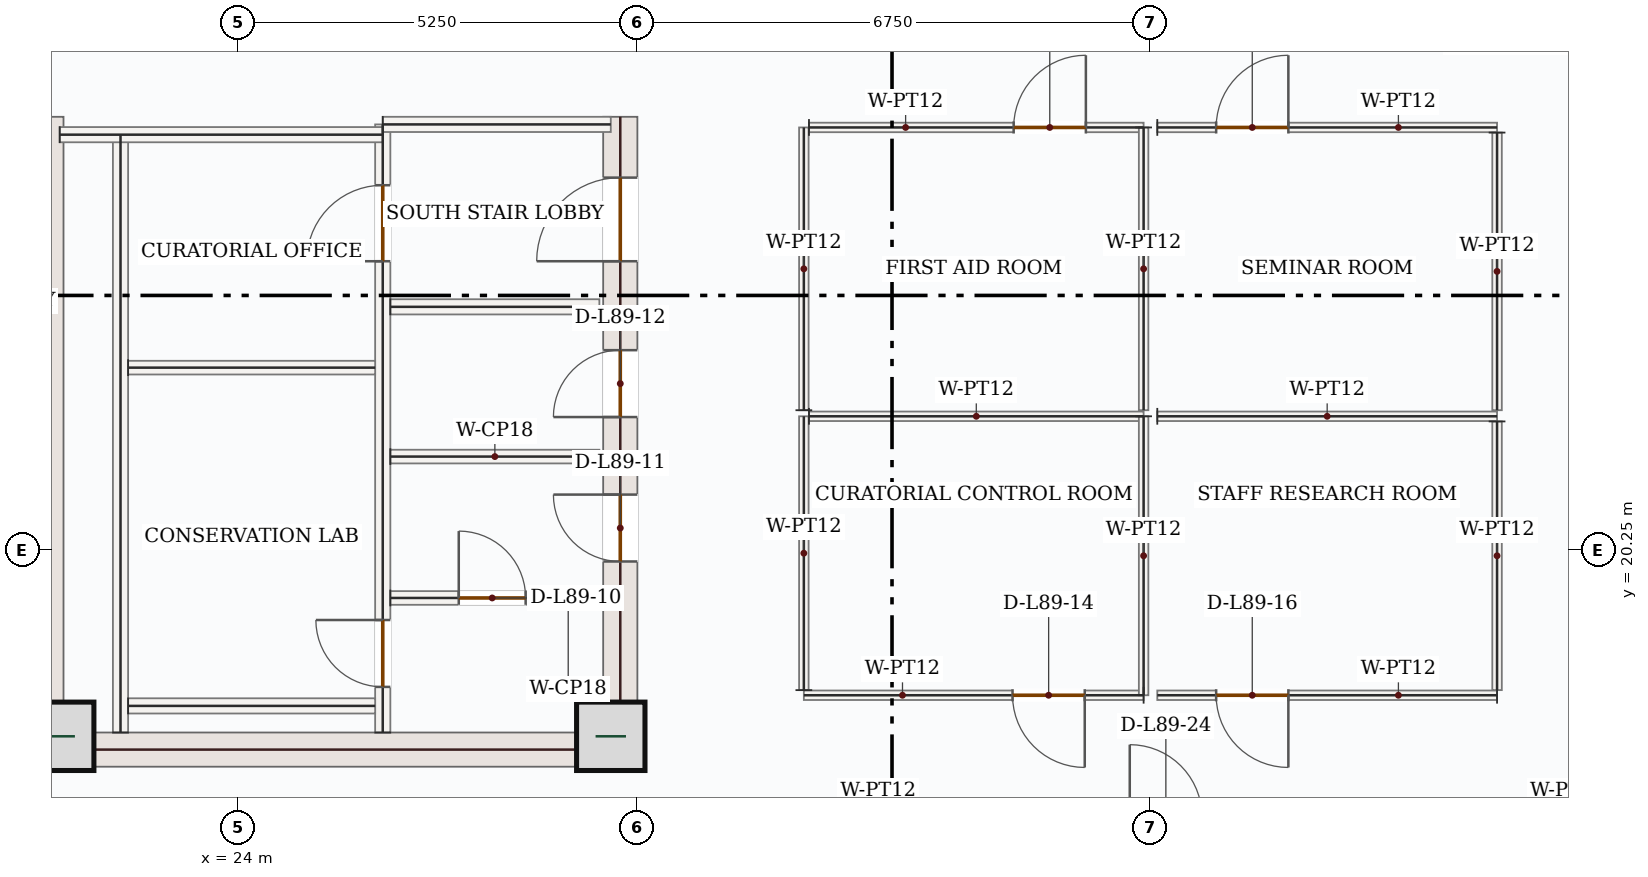
"""IFC4 building model, lengths in metres.
Left out: names, types, materials, properties, quantities, classifications, styles, units other than length and angle.
Written with IfcOpenShell. Run it as: python <this file> out.ifc"""

import sys

from ifc_helpers import new_model, si_unit, direction, frame, frame_2d, origin, origin_2d, place, context, subcontext, project, spatial, rectangle, extrude, source, transform, mapped, element, fill, save


model = new_model("IFC4")
c1 = context("Model", 3, precision=1e-05, world=origin(), true_north=direction((0.0, 1.0)))
c2 = subcontext(c1, "Body", "Model", "MODEL_VIEW")
j1 = project(units=[si_unit("LENGTHUNIT", "METRE"), si_unit("PLANEANGLEUNIT", "RADIAN")], contexts=[c1])
p1 = place(None, origin())
s1 = spatial("IfcSite", under=j1, at=p1, CompositionType="ELEMENT")
p2 = place(p1, origin())
s2 = spatial("IfcBuilding", under=s1, at=p2, CompositionType="ELEMENT")
p3 = place(p2, frame((0.0, 0.0, 365.85)))
s3 = spatial("IfcBuildingStorey", under=s2, at=p3, CompositionType="ELEMENT", Elevation=365.85)
m1 = source(origin(), c2, "Body", "SweptSolid", [
    extrude(rectangle(XDim=8.55, YDim=0.45, at=frame_2d((4.275, 0.0))), origin(), (0.0, 0.0, 1.0), 4.55),
])
p4 = place(p3, frame((21.475, 17.4, 0.0), z_axis=(0.0, 0.0, 1.0), x_axis=(0.0, 1.0, 0.0)))
e1 = element("IfcWall", 1, at=p4, inside=s3, PredefinedType="SHEAR", context=c2, shape_type="MappedRepresentation", body=[
    mapped(m1, transform((0.0, 0.0, 0.0), x_axis=(1.0, 0.0, 0.0), y_axis=(0.0, 1.0, 0.0), z_axis=(0.0, 0.0, 1.0), scale=1.0)),
])
p5 = place(p3, frame((29.025, 17.4, 0.0), z_axis=(0.0, 0.0, 1.0), x_axis=(0.0, 1.0, 0.0)))
e2 = element("IfcWall", 2, at=p5, inside=s3, PredefinedType="SHEAR", context=c2, shape_type="SweptSolid", body=[
    extrude(rectangle(XDim=8.55, YDim=0.45, at=frame_2d((4.275, 0.0))), origin(), (0.0, 0.0, 1.0), 4.55),
])
p6 = place(p5, frame((6.65, 0.0, 0.0)))
e3 = element("IfcOpeningElement", 3, at=p6, cuts=e2, PredefinedType="OPENING", context=c2, shape_type="SweptSolid", body=[
    extrude(rectangle(XDim=1.1, YDim=2.2, at=frame_2d((0.55, 1.1))), frame((0.0, 0.235, 0.0), z_axis=(0.0, -1.0, 0.0), x_axis=(1.0, 0.0, 0.0)), (0.0, 0.0, 1.0), 0.47),
])
p7 = place(p5, frame((2.7, 0.0, 0.0)))
e4 = element("IfcOpeningElement", 4, at=p7, cuts=e2, PredefinedType="OPENING", context=c2, shape_type="SweptSolid", body=[
    extrude(rectangle(XDim=0.88, YDim=2.1, at=frame_2d((0.44, 1.05))), frame((0.0, 0.235, 0.0), z_axis=(0.0, -1.0, 0.0), x_axis=(1.0, 0.0, 0.0)), (0.0, 0.0, 1.0), 0.47),
])
p8 = place(p5, frame((4.6, 0.0, 0.0)))
e5 = element("IfcOpeningElement", 5, at=p8, cuts=e2, PredefinedType="OPENING", context=c2, shape_type="SweptSolid", body=[
    extrude(rectangle(XDim=0.88, YDim=2.1, at=frame_2d((0.44, 1.05))), frame((0.0, 0.235, 0.0), z_axis=(0.0, -1.0, 0.0), x_axis=(1.0, 0.0, 0.0)), (0.0, 0.0, 1.0), 0.47),
])
m2 = source(origin(), c2, "Body", "SweptSolid", [
    extrude(rectangle(XDim=7.1, YDim=0.45, at=frame_2d((3.55, 0.0))), origin(), (0.0, 0.0, 1.0), 4.55),
])
p9 = place(p3, frame((21.7, 17.625, 0.0), z_axis=(0.0, 0.0, 1.0), x_axis=(1.0, 0.0, 0.0)))
e6 = element("IfcWall", 6, at=p9, inside=s3, PredefinedType="SHEAR", context=c2, shape_type="MappedRepresentation", body=[
    mapped(m2, transform((0.0, 0.0, 0.0), x_axis=(1.0, 0.0, 0.0), y_axis=(0.0, 1.0, 0.0), z_axis=(0.0, 0.0, 1.0), scale=1.0)),
])
m3 = source(origin(), c2, "Body", "SweptSolid", [
    extrude(rectangle(XDim=0.9, YDim=0.9, at=origin_2d()), origin(), (0.0, 0.0, 1.0), 4.8),
])
for number, where, z_axis, x_axis in (
    (7, (21.65, 17.8, 0.0), (0.0, 0.0, 1.0), (1.0, 0.0, 0.0)),
    (8, (28.9, 17.8, 0.0), (0.0, 0.0, 1.0), (1.0, 0.0, 0.0)),
):
    element("IfcColumn", number, at=place(p3, frame(where, z_axis=z_axis, x_axis=x_axis)), inside=s3, PredefinedType="COLUMN", context=c2, shape_type="MappedRepresentation", body=[
        mapped(m3, transform((0.0, 0.0, 0.0), x_axis=(1.0, 0.0, 0.0), y_axis=(0.0, 1.0, 0.0), z_axis=(0.0, 0.0, 1.0), scale=1.0)),
    ])
p10 = place(p3, frame((22.658, 14.74, 0.0), z_axis=(0.0, 0.0, 1.0), x_axis=(-0.707106781187, 0.707106781187, 0.0)))
e9 = element("IfcWall", 9, at=p10, inside=s3, PredefinedType="SOLIDWALL", context=c2, shape_type="SweptSolid", body=[
    extrude(rectangle(XDim=5.258, YDim=0.28, at=frame_2d((2.629, 0.0))), origin(), (0.0, 0.0, 1.0), 4.55),
])
p11 = place(p10, frame((1.879, 0.0, 0.85)))
e10 = element("IfcOpeningElement", 10, at=p11, cuts=e9, PredefinedType="OPENING", context=c2, shape_type="SweptSolid", body=[
    extrude(rectangle(XDim=1.5, YDim=1.5, at=frame_2d((0.75, 0.75))), frame((0.0, 0.15, 0.0), z_axis=(0.0, -1.0, 0.0), x_axis=(1.0, 0.0, 0.0)), (0.0, 0.0, 1.0), 0.3),
])
m4 = source(origin(), c2, "Body", "SweptSolid", [
    extrude(rectangle(XDim=7.87, YDim=0.2, at=frame_2d((3.935, 0.0))), origin(), (0.0, 0.0, 1.0), 4.55),
])
p12 = place(p3, frame((22.45, 17.85, 0.0), z_axis=(0.0, 0.0, 1.0), x_axis=(0.0, 1.0, 0.0)))
e11 = element("IfcWall", 11, at=p12, inside=s3, PredefinedType="SOLIDWALL", context=c2, shape_type="MappedRepresentation", body=[
    mapped(m4, transform((0.0, 0.0, 0.0), x_axis=(1.0, 0.0, 0.0), y_axis=(0.0, 1.0, 0.0), z_axis=(0.0, 0.0, 1.0), scale=1.0)),
])
p13 = place(p3, frame((25.9, 17.85, 0.0), z_axis=(0.0, 0.0, 1.0), x_axis=(0.0, 1.0, 0.0)))
e12 = element("IfcWall", 12, at=p13, inside=s3, PredefinedType="SOLIDWALL", context=c2, shape_type="SweptSolid", body=[
    extrude(rectangle(XDim=8.0, YDim=0.2, at=frame_2d((4.0, 0.0))), origin(), (0.0, 0.0, 1.0), 4.55),
])
p14 = place(p13, frame((6.2, 0.0, 0.0)))
e13 = element("IfcOpeningElement", 13, at=p14, cuts=e12, PredefinedType="OPENING", context=c2, shape_type="SweptSolid", body=[
    extrude(rectangle(XDim=1.0, YDim=2.15, at=frame_2d((0.5, 1.075))), frame((0.0, 0.11, 0.0), z_axis=(0.0, -1.0, 0.0), x_axis=(1.0, 0.0, 0.0)), (0.0, 0.0, 1.0), 0.22),
])
p15 = place(p13, frame((0.6, 0.0, 0.0)))
e14 = element("IfcOpeningElement", 14, at=p15, cuts=e12, PredefinedType="OPENING", context=c2, shape_type="SweptSolid", body=[
    extrude(rectangle(XDim=0.88, YDim=2.1, at=frame_2d((0.44, 1.05))), frame((0.0, 0.11, 0.0), z_axis=(0.0, -1.0, 0.0), x_axis=(1.0, 0.0, 0.0)), (0.0, 0.0, 1.0), 0.22),
])
m5 = source(origin(), c2, "Body", "SweptSolid", [
    extrude(rectangle(XDim=4.25, YDim=0.2, at=frame_2d((2.125, 0.0))), origin(), (0.0, 0.0, 1.0), 4.55),
])
p16 = place(p3, frame((21.65, 25.715, 0.0), z_axis=(0.0, 0.0, 1.0), x_axis=(1.0, 0.0, 0.0)))
e15 = element("IfcWall", 15, at=p16, inside=s3, PredefinedType="SOLIDWALL", context=c2, shape_type="MappedRepresentation", body=[
    mapped(m5, transform((0.0, 0.0, 0.0), x_axis=(1.0, 0.0, 0.0), y_axis=(0.0, 1.0, 0.0), z_axis=(0.0, 0.0, 1.0), scale=1.0)),
])
m6 = source(origin(), c2, "Body", "SweptSolid", [
    extrude(rectangle(XDim=3.0, YDim=0.2, at=frame_2d((1.5, 0.0))), origin(), (0.0, 0.0, 1.0), 4.55),
])
p17 = place(p3, frame((25.9, 25.85, 0.0), z_axis=(0.0, 0.0, 1.0), x_axis=(1.0, 0.0, 0.0)))
e16 = element("IfcWall", 16, at=p17, inside=s3, PredefinedType="SOLIDWALL", context=c2, shape_type="MappedRepresentation", body=[
    mapped(m6, transform((0.0, 0.0, 0.0), x_axis=(1.0, 0.0, 0.0), y_axis=(0.0, 1.0, 0.0), z_axis=(0.0, 0.0, 1.0), scale=1.0)),
])
m7 = source(origin(), c2, "Body", "SweptSolid", [
    extrude(rectangle(XDim=3.25, YDim=0.2, at=frame_2d((1.625, 0.0))), origin(), (0.0, 0.0, 1.0), 4.55),
])
p18 = place(p3, frame((22.55, 18.2, 0.0), z_axis=(0.0, 0.0, 1.0), x_axis=(1.0, 0.0, 0.0)))
e17 = element("IfcWall", 17, at=p18, inside=s3, PredefinedType="SOLIDWALL", context=c2, shape_type="MappedRepresentation", body=[
    mapped(m7, transform((0.0, 0.0, 0.0), x_axis=(1.0, 0.0, 0.0), y_axis=(0.0, 1.0, 0.0), z_axis=(0.0, 0.0, 1.0), scale=1.0)),
])
m8 = source(origin(), c2, "Body", "SweptSolid", [
    extrude(rectangle(XDim=3.25, YDim=0.18, at=frame_2d((1.625, 0.0))), origin(), (0.0, 0.0, 1.0), 4.55),
])
p19 = place(p3, frame((22.55, 22.65, 0.0), z_axis=(0.0, 0.0, 1.0), x_axis=(1.0, 0.0, 0.0)))
e18 = element("IfcWall", 18, at=p19, inside=s3, PredefinedType="PARTITIONING", context=c2, shape_type="MappedRepresentation", body=[
    mapped(m8, transform((0.0, 0.0, 0.0), x_axis=(1.0, 0.0, 0.0), y_axis=(0.0, 1.0, 0.0), z_axis=(0.0, 0.0, 1.0), scale=1.0)),
])
m9 = source(origin(), c2, "Body", "SweptSolid", [
    extrude(rectangle(XDim=2.75, YDim=0.2, at=frame_2d((1.375, 0.0))), origin(), (0.0, 0.0, 1.0), 4.55),
])
p20 = place(p3, frame((26.0, 23.45, 0.0), z_axis=(0.0, 0.0, 1.0), x_axis=(1.0, 0.0, 0.0)))
e19 = element("IfcWall", 19, at=p20, inside=s3, PredefinedType="SOLIDWALL", context=c2, shape_type="MappedRepresentation", body=[
    mapped(m9, transform((0.0, 0.0, 0.0), x_axis=(1.0, 0.0, 0.0), y_axis=(0.0, 1.0, 0.0), z_axis=(0.0, 0.0, 1.0), scale=1.0)),
])
p21 = place(p3, frame((26.0, 19.62, 0.0), z_axis=(0.0, 0.0, 1.0), x_axis=(1.0, 0.0, 0.0)))
e20 = element("IfcWall", 20, at=p21, inside=s3, PredefinedType="PARTITIONING", context=c2, shape_type="SweptSolid", body=[
    extrude(rectangle(XDim=2.75, YDim=0.18, at=frame_2d((1.375, 0.0))), origin(), (0.0, 0.0, 1.0), 4.55),
])
p22 = place(p21, frame((0.9, 0.0, 0.0)))
e21 = element("IfcOpeningElement", 21, at=p22, cuts=e20, PredefinedType="OPENING", context=c2, shape_type="SweptSolid", body=[
    extrude(rectangle(XDim=0.88, YDim=2.1, at=frame_2d((0.44, 1.05))), frame((0.0, 0.1, 0.0), z_axis=(0.0, -1.0, 0.0), x_axis=(1.0, 0.0, 0.0)), (0.0, 0.0, 1.0), 0.2),
])
m10 = source(origin(), c2, "Body", "SweptSolid", [
    extrude(rectangle(XDim=2.75, YDim=0.18, at=frame_2d((1.375, 0.0))), origin(), (0.0, 0.0, 1.0), 4.55),
])
p23 = place(p3, frame((26.0, 21.48, 0.0), z_axis=(0.0, 0.0, 1.0), x_axis=(1.0, 0.0, 0.0)))
e22 = element("IfcWall", 22, at=p23, inside=s3, PredefinedType="PARTITIONING", context=c2, shape_type="MappedRepresentation", body=[
    mapped(m10, transform((0.0, 0.0, 0.0), x_axis=(1.0, 0.0, 0.0), y_axis=(0.0, 1.0, 0.0), z_axis=(0.0, 0.0, 1.0), scale=1.0)),
])
p24 = place(p3, frame((35.91, 18.34, 0.0), z_axis=(0.0, 0.0, 1.0), x_axis=(-1.0, 0.0, 0.0)))
e23 = element("IfcWall", 23, at=p24, inside=s3, PredefinedType="PARTITIONING", context=c2, shape_type="SweptSolid", body=[
    extrude(rectangle(XDim=4.47, YDim=0.125, at=frame_2d((2.235, 0.0))), origin(), (0.0, 0.0, 1.0), 4.55),
])
p25 = place(p24, frame((0.774, 0.0, 0.0)))
e24 = element("IfcOpeningElement", 24, at=p25, cuts=e23, PredefinedType="OPENING", context=c2, shape_type="SweptSolid", body=[
    extrude(rectangle(XDim=0.95, YDim=2.15, at=frame_2d((0.475, 1.075))), frame((0.0, 0.073, 0.0), z_axis=(0.0, -1.0, 0.0), x_axis=(1.0, 0.0, 0.0)), (0.0, 0.0, 1.0), 0.145),
])
m11 = source(origin(), c2, "Body", "SweptSolid", [
    extrude(rectangle(XDim=3.603, YDim=0.125, at=frame_2d((1.801, 0.0))), origin(), (0.0, 0.0, 1.0), 4.55),
])
p26 = place(p3, frame((31.44, 18.407, 0.0), z_axis=(0.0, 0.0, 1.0), x_axis=(0.0, 1.0, 0.0)))
e25 = element("IfcWall", 25, at=p26, inside=s3, PredefinedType="PARTITIONING", context=c2, shape_type="MappedRepresentation", body=[
    mapped(m11, transform((0.0, 0.0, 0.0), x_axis=(1.0, 0.0, 0.0), y_axis=(0.0, 1.0, 0.0), z_axis=(0.0, 0.0, 1.0), scale=1.0)),
])
m12 = source(origin(), c2, "Body", "SweptSolid", [
    extrude(rectangle(XDim=4.402, YDim=0.125, at=frame_2d((2.201, 0.0))), origin(), (0.0, 0.0, 1.0), 4.55),
])
p27 = place(p3, frame((31.508, 22.01, 0.0), z_axis=(0.0, 0.0, 1.0), x_axis=(1.0, 0.0, 0.0)))
e26 = element("IfcWall", 26, at=p27, inside=s3, PredefinedType="PARTITIONING", context=c2, shape_type="MappedRepresentation", body=[
    mapped(m12, transform((0.0, 0.0, 0.0), x_axis=(1.0, 0.0, 0.0), y_axis=(0.0, 1.0, 0.0), z_axis=(0.0, 0.0, 1.0), scale=1.0)),
])
m13 = source(origin(), c2, "Body", "SweptSolid", [
    extrude(rectangle(XDim=3.67, YDim=0.125, at=frame_2d((1.835, 0.0))), origin(), (0.0, 0.0, 1.0), 4.55),
])
p28 = place(p3, frame((35.91, 22.01, 0.0), z_axis=(0.0, 0.0, 1.0), x_axis=(0.0, -1.0, 0.0)))
e27 = element("IfcWall", 27, at=p28, inside=s3, PredefinedType="PARTITIONING", context=c2, shape_type="MappedRepresentation", body=[
    mapped(m13, transform((0.0, 0.0, 0.0), x_axis=(1.0, 0.0, 0.0), y_axis=(0.0, 1.0, 0.0), z_axis=(0.0, 0.0, 1.0), scale=1.0)),
])
p29 = place(p3, frame((40.56, 18.34, 0.0), z_axis=(0.0, 0.0, 1.0), x_axis=(-1.0, 0.0, 0.0)))
e28 = element("IfcWall", 28, at=p29, inside=s3, PredefinedType="PARTITIONING", context=c2, shape_type="SweptSolid", body=[
    extrude(rectangle(XDim=4.47, YDim=0.125, at=frame_2d((2.235, 0.0))), origin(), (0.0, 0.0, 1.0), 4.55),
])
p30 = place(p29, frame((2.746, 0.0, 0.0)))
e29 = element("IfcOpeningElement", 29, at=p30, cuts=e28, PredefinedType="OPENING", context=c2, shape_type="SweptSolid", body=[
    extrude(rectangle(XDim=0.95, YDim=2.15, at=frame_2d((0.475, 1.075))), frame((0.0, 0.073, 0.0), z_axis=(0.0, -1.0, 0.0), x_axis=(1.0, 0.0, 0.0)), (0.0, 0.0, 1.0), 0.145),
])
m14 = source(origin(), c2, "Body", "SweptSolid", [
    extrude(rectangle(XDim=4.47, YDim=0.125, at=frame_2d((2.235, 0.0))), origin(), (0.0, 0.0, 1.0), 4.55),
])
p31 = place(p3, frame((36.09, 22.01, 0.0), z_axis=(0.0, 0.0, 1.0), x_axis=(1.0, 0.0, 0.0)))
e30 = element("IfcWall", 30, at=p31, inside=s3, PredefinedType="PARTITIONING", context=c2, shape_type="MappedRepresentation", body=[
    mapped(m14, transform((0.0, 0.0, 0.0), x_axis=(1.0, 0.0, 0.0), y_axis=(0.0, 1.0, 0.0), z_axis=(0.0, 0.0, 1.0), scale=1.0)),
])
m15 = source(origin(), c2, "Body", "SweptSolid", [
    extrude(rectangle(XDim=3.535, YDim=0.125, at=frame_2d((1.768, 0.0))), origin(), (0.0, 0.0, 1.0), 4.55),
])
p32 = place(p3, frame((40.56, 21.942, 0.0), z_axis=(0.0, 0.0, 1.0), x_axis=(0.0, -1.0, 0.0)))
e31 = element("IfcWall", 31, at=p32, inside=s3, PredefinedType="PARTITIONING", context=c2, shape_type="MappedRepresentation", body=[
    mapped(m15, transform((0.0, 0.0, 0.0), x_axis=(1.0, 0.0, 0.0), y_axis=(0.0, 1.0, 0.0), z_axis=(0.0, 0.0, 1.0), scale=1.0)),
])
m16 = source(origin(), c2, "Body", "SweptSolid", [
    extrude(rectangle(XDim=3.72, YDim=0.125, at=frame_2d((1.86, 0.0))), origin(), (0.0, 0.0, 1.0), 4.55),
])
p33 = place(p3, frame((31.44, 22.09, 0.0), z_axis=(0.0, 0.0, 1.0), x_axis=(0.0, 1.0, 0.0)))
e32 = element("IfcWall", 32, at=p33, inside=s3, PredefinedType="PARTITIONING", context=c2, shape_type="MappedRepresentation", body=[
    mapped(m16, transform((0.0, 0.0, 0.0), x_axis=(1.0, 0.0, 0.0), y_axis=(0.0, 1.0, 0.0), z_axis=(0.0, 0.0, 1.0), scale=1.0)),
])
p34 = place(p3, frame((31.508, 25.81, 0.0), z_axis=(0.0, 0.0, 1.0), x_axis=(1.0, 0.0, 0.0)))
e33 = element("IfcWall", 33, at=p34, inside=s3, PredefinedType="PARTITIONING", context=c2, shape_type="SweptSolid", body=[
    extrude(rectangle(XDim=4.402, YDim=0.125, at=frame_2d((2.201, 0.0))), origin(), (0.0, 0.0, 1.0), 4.55),
])
p35 = place(p34, frame((2.693, 0.0, 0.0)))
e34 = element("IfcOpeningElement", 34, at=p35, cuts=e33, PredefinedType="OPENING", context=c2, shape_type="SweptSolid", body=[
    extrude(rectangle(XDim=0.95, YDim=2.15, at=frame_2d((0.475, 1.075))), frame((0.0, 0.073, 0.0), z_axis=(0.0, -1.0, 0.0), x_axis=(1.0, 0.0, 0.0)), (0.0, 0.0, 1.0), 0.145),
])
p36 = place(p3, frame((35.91, 25.81, 0.0), z_axis=(0.0, 0.0, 1.0), x_axis=(0.0, -1.0, 0.0)))
e35 = element("IfcWall", 35, at=p36, inside=s3, PredefinedType="PARTITIONING", context=c2, shape_type="MappedRepresentation", body=[
    mapped(m16, transform((0.0, 0.0, 0.0), x_axis=(1.0, 0.0, 0.0), y_axis=(0.0, 1.0, 0.0), z_axis=(0.0, 0.0, 1.0), scale=1.0)),
])
p37 = place(p3, frame((36.09, 25.81, 0.0), z_axis=(0.0, 0.0, 1.0), x_axis=(1.0, 0.0, 0.0)))
e36 = element("IfcWall", 36, at=p37, inside=s3, PredefinedType="PARTITIONING", context=c2, shape_type="SweptSolid", body=[
    extrude(rectangle(XDim=4.47, YDim=0.125, at=frame_2d((2.235, 0.0))), origin(), (0.0, 0.0, 1.0), 4.55),
])
p38 = place(p37, frame((0.774, 0.0, 0.0)))
e37 = element("IfcOpeningElement", 37, at=p38, cuts=e36, PredefinedType="OPENING", context=c2, shape_type="SweptSolid", body=[
    extrude(rectangle(XDim=0.95, YDim=2.15, at=frame_2d((0.475, 1.075))), frame((0.0, 0.073, 0.0), z_axis=(0.0, -1.0, 0.0), x_axis=(1.0, 0.0, 0.0)), (0.0, 0.0, 1.0), 0.145),
])
m17 = source(origin(), c2, "Body", "SweptSolid", [
    extrude(rectangle(XDim=3.652, YDim=0.125, at=frame_2d((1.826, 0.0))), origin(), (0.0, 0.0, 1.0), 4.55),
])
p39 = place(p3, frame((40.56, 25.742, 0.0), z_axis=(0.0, 0.0, 1.0), x_axis=(0.0, -1.0, 0.0)))
e38 = element("IfcWall", 38, at=p39, inside=s3, PredefinedType="PARTITIONING", context=c2, shape_type="MappedRepresentation", body=[
    mapped(m17, transform((0.0, 0.0, 0.0), x_axis=(1.0, 0.0, 0.0), y_axis=(0.0, 1.0, 0.0), z_axis=(0.0, 0.0, 1.0), scale=1.0)),
])
m18 = source(origin(), c2, "Body", "SweptSolid", [
    extrude(rectangle(XDim=1.0, YDim=2.15, at=frame_2d((0.5, 1.075))), frame((0.0, 0.025, 0.0), z_axis=(0.0, -1.0, 0.0), x_axis=(1.0, 0.0, 0.0)), (0.0, 0.0, 1.0), 0.05),
])
p40 = place(p14, origin())
e39 = element("IfcDoor", 39, at=p40, inside=s3, OperationType="SINGLE_SWING_LEFT", PredefinedType="DOOR", context=c2, shape_type="MappedRepresentation", body=[
    mapped(m18, transform((0.0, 0.0, 0.0), x_axis=(1.0, 0.0, 0.0), y_axis=(0.0, 1.0, 0.0), z_axis=(0.0, 0.0, 1.0), scale=1.0)),
])
fill(e13, e39)
m19 = source(origin(), c2, "Body", "SweptSolid", [
    extrude(rectangle(XDim=0.88, YDim=2.1, at=frame_2d((0.44, 1.05))), frame((0.0, 0.025, 0.0), z_axis=(0.0, -1.0, 0.0), x_axis=(1.0, 0.0, 0.0)), (0.0, 0.0, 1.0), 0.05),
])
p41 = place(p15, origin())
e40 = element("IfcDoor", 40, at=p41, inside=s3, OperationType="SINGLE_SWING_RIGHT", PredefinedType="DOOR", context=c2, shape_type="MappedRepresentation", body=[
    mapped(m19, transform((0.0, 0.0, 0.0), x_axis=(1.0, 0.0, 0.0), y_axis=(0.0, 1.0, 0.0), z_axis=(0.0, 0.0, 1.0), scale=1.0)),
])
fill(e14, e40)
m20 = source(origin(), c2, "Body", "SweptSolid", [
    extrude(rectangle(XDim=1.1, YDim=2.2, at=frame_2d((0.55, 1.1))), frame((0.0, 0.025, 0.0), z_axis=(0.0, -1.0, 0.0), x_axis=(1.0, 0.0, 0.0)), (0.0, 0.0, 1.0), 0.05),
])
p42 = place(p6, origin())
e41 = element("IfcDoor", 41, at=p42, inside=s3, OperationType="SINGLE_SWING_LEFT", PredefinedType="DOOR", context=c2, shape_type="MappedRepresentation", body=[
    mapped(m20, transform((0.0, 0.0, 0.0), x_axis=(1.0, 0.0, 0.0), y_axis=(0.0, 1.0, 0.0), z_axis=(0.0, 0.0, 1.0), scale=1.0)),
])
fill(e3, e41)
p43 = place(p22, origin())
e42 = element("IfcDoor", 42, at=p43, inside=s3, OperationType="SINGLE_SWING_LEFT", PredefinedType="DOOR", context=c2, shape_type="MappedRepresentation", body=[
    mapped(m19, transform((0.0, 0.0, 0.0), x_axis=(1.0, 0.0, 0.0), y_axis=(0.0, 1.0, 0.0), z_axis=(0.0, 0.0, 1.0), scale=1.0)),
])
fill(e21, e42)
p44 = place(p7, origin())
e43 = element("IfcDoor", 43, at=p44, inside=s3, OperationType="SINGLE_SWING_RIGHT", PredefinedType="DOOR", context=c2, shape_type="MappedRepresentation", body=[
    mapped(m19, transform((0.0, 0.0, 0.0), x_axis=(1.0, 0.0, 0.0), y_axis=(0.0, 1.0, 0.0), z_axis=(0.0, 0.0, 1.0), scale=1.0)),
])
fill(e4, e43)
p45 = place(p8, origin())
e44 = element("IfcDoor", 44, at=p45, inside=s3, OperationType="SINGLE_SWING_LEFT", PredefinedType="DOOR", context=c2, shape_type="MappedRepresentation", body=[
    mapped(m19, transform((0.0, 0.0, 0.0), x_axis=(1.0, 0.0, 0.0), y_axis=(0.0, 1.0, 0.0), z_axis=(0.0, 0.0, 1.0), scale=1.0)),
])
fill(e5, e44)
m21 = source(origin(), c2, "Body", "SweptSolid", [
    extrude(rectangle(XDim=0.95, YDim=2.15, at=frame_2d((0.475, 1.075))), frame((0.0, 0.025, 0.0), z_axis=(0.0, -1.0, 0.0), x_axis=(1.0, 0.0, 0.0)), (0.0, 0.0, 1.0), 0.05),
])
p46 = place(p25, origin())
e45 = element("IfcDoor", 45, at=p46, inside=s3, OperationType="SINGLE_SWING_LEFT", PredefinedType="DOOR", context=c2, shape_type="MappedRepresentation", body=[
    mapped(m21, transform((0.0, 0.0, 0.0), x_axis=(1.0, 0.0, 0.0), y_axis=(0.0, 1.0, 0.0), z_axis=(0.0, 0.0, 1.0), scale=1.0)),
])
fill(e24, e45)
p47 = place(p35, origin())
e46 = element("IfcDoor", 46, at=p47, inside=s3, OperationType="SINGLE_SWING_RIGHT", PredefinedType="DOOR", context=c2, shape_type="MappedRepresentation", body=[
    mapped(m21, transform((0.0, 0.0, 0.0), x_axis=(1.0, 0.0, 0.0), y_axis=(0.0, 1.0, 0.0), z_axis=(0.0, 0.0, 1.0), scale=1.0)),
])
fill(e34, e46)
p48 = place(p30, origin())
e47 = element("IfcDoor", 47, at=p48, inside=s3, OperationType="SINGLE_SWING_LEFT", PredefinedType="DOOR", context=c2, shape_type="MappedRepresentation", body=[
    mapped(m21, transform((0.0, 0.0, 0.0), x_axis=(1.0, 0.0, 0.0), y_axis=(0.0, 1.0, 0.0), z_axis=(0.0, 0.0, 1.0), scale=1.0)),
])
fill(e29, e47)
p49 = place(p38, origin())
e48 = element("IfcDoor", 48, at=p49, inside=s3, OperationType="SINGLE_SWING_RIGHT", PredefinedType="DOOR", context=c2, shape_type="MappedRepresentation", body=[
    mapped(m21, transform((0.0, 0.0, 0.0), x_axis=(1.0, 0.0, 0.0), y_axis=(0.0, 1.0, 0.0), z_axis=(0.0, 0.0, 1.0), scale=1.0)),
])
fill(e37, e48)
save(model, sys.argv[1])
